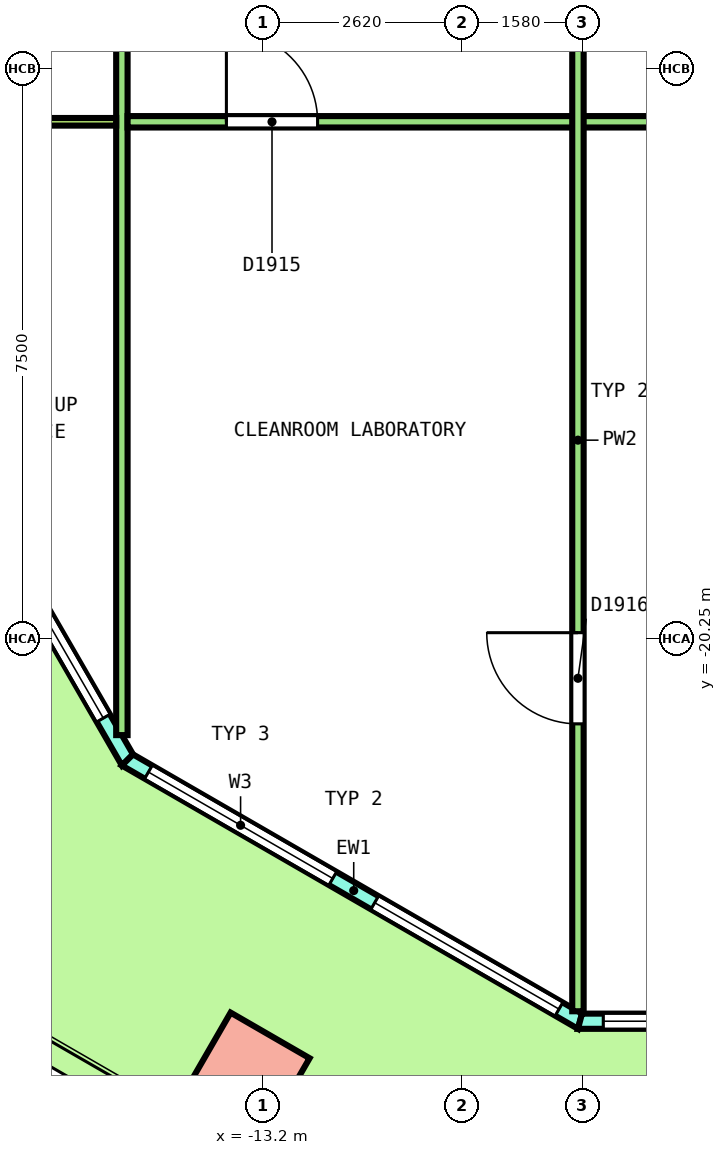
"""IFC4 building model, lengths in metres.
Left out: names, types, materials, properties, quantities, classifications, styles, units other than length and angle.
Written with IfcOpenShell. Run it as: python <this file> out.ifc"""

import sys

from ifc_helpers import new_model, si_unit, direction, frame, frame_2d, origin, origin_2d, place, context, subcontext, project, spatial, polyline, rectangle, outline, extrude, element, fill, save


model = new_model("IFC4")
c1 = context("Model", 3, precision=1e-05, world=origin(), true_north=direction((0.0, 1.0)))
c2 = subcontext(c1, "Body", "Model", "MODEL_VIEW")
j1 = project(units=[si_unit("LENGTHUNIT", "METRE"), si_unit("PLANEANGLEUNIT", "RADIAN")], contexts=[c1])
p1 = place(None, origin())
s1 = spatial("IfcSite", under=j1, at=p1, CompositionType="ELEMENT")
p2 = place(p1, origin())
s2 = spatial("IfcBuilding", under=s1, at=p2, CompositionType="ELEMENT")
p3 = place(p2, frame((0.0, 0.0, 193.6)))
s3 = spatial("IfcBuildingStorey", under=s2, at=p3, CompositionType="ELEMENT", Elevation=193.6)
p4 = place(p3, frame((-13.408, -25.989, 0.0), z_axis=(0.0, 0.0, 1.0), x_axis=(0.866025403784, -0.5, 0.0)))
e1 = element("IfcColumn", 1, at=p4, inside=s3, PredefinedType="COLUMN", context=c2, shape_type="SweptSolid", body=[
    extrude(rectangle(XDim=1.2, YDim=1.2, at=origin_2d()), origin(), (0.0, 0.0, 1.0), 4.04),
])
p5 = place(p3, frame((-26.411, -2.055, 0.0), z_axis=(0.0, 0.0, 1.0), x_axis=(0.50000204422, -0.86602422355, 0.0)))
e2 = element("IfcWall", 2, at=p5, inside=s3, PredefinedType="SOLIDWALL", context=c2, shape_type="SweptSolid", body=[
    extrude(outline(polyline([(-0.027, -0.1), (1.014, -0.1), (2.055, -0.1), (3.097, -0.1), (4.138, -0.1), (5.179, -0.1), (6.22, -0.1), (7.261, -0.1), (8.303, -0.1), (9.344, -0.1), (10.385, -0.1), (11.426, -0.1), (12.468, -0.1), (13.509, -0.1), (14.55, -0.1), (15.591, -0.1), (16.632, -0.1), (17.673, -0.1), (18.715, -0.1), (19.756, -0.1), (20.797, -0.1), (21.838, -0.1), (22.879, -0.1), (22.826, 0.1), (21.789, 0.1), (20.753, 0.1), (19.717, 0.1), (18.68, 0.1), (17.644, 0.1), (16.608, 0.1), (15.572, 0.1), (14.535, 0.1), (13.499, 0.1), (12.463, 0.1), (11.426, 0.1), (10.39, 0.1), (9.354, 0.1), (8.317, 0.1), (7.281, 0.1), (6.245, 0.1), (5.208, 0.1), (4.172, 0.1), (3.136, 0.1), (2.099, 0.1), (1.063, 0.1), (0.027, 0.1), (-0.027, -0.1)])), origin(), (0.0, 0.0, 1.0), 4.1),
])
p6 = place(p5, frame((0.635, 0.0, 0.1)))
e3 = element("IfcOpeningElement", 3, at=p6, cuts=e2, PredefinedType="OPENING", context=c2, shape_type="SweptSolid", body=[
    extrude(rectangle(XDim=3.3, YDim=2.9, at=frame_2d((1.65, 1.45))), frame((0.0, 0.11, 0.0), z_axis=(0.0, -1.0, 0.0), x_axis=(1.0, 0.0, 0.0)), (0.0, 0.0, 1.0), 0.22),
])
p7 = place(p5, frame((5.206, 0.0, 0.1)))
e4 = element("IfcOpeningElement", 4, at=p7, cuts=e2, PredefinedType="OPENING", context=c2, shape_type="SweptSolid", body=[
    extrude(rectangle(XDim=3.3, YDim=2.9, at=frame_2d((1.65, 1.45))), frame((0.0, 0.11, 0.0), z_axis=(0.0, -1.0, 0.0), x_axis=(1.0, 0.0, 0.0)), (0.0, 0.0, 1.0), 0.22),
])
p8 = place(p5, frame((10.526, 0.0, 0.0)))
e5 = element("IfcOpeningElement", 5, at=p8, cuts=e2, PredefinedType="OPENING", context=c2, shape_type="SweptSolid", body=[
    extrude(rectangle(XDim=1.8, YDim=2.4, at=frame_2d((0.9, 1.2))), frame((0.0, 0.11, 0.0), z_axis=(0.0, -1.0, 0.0), x_axis=(1.0, 0.0, 0.0)), (0.0, 0.0, 1.0), 0.22),
])
p9 = place(p5, frame((10.526, 0.0, 2.55)))
e6 = element("IfcOpeningElement", 6, at=p9, cuts=e2, PredefinedType="OPENING", context=c2, shape_type="SweptSolid", body=[
    extrude(rectangle(XDim=1.8, YDim=0.45, at=frame_2d((0.9, 0.225))), frame((0.0, 0.11, 0.0), z_axis=(0.0, -1.0, 0.0), x_axis=(1.0, 0.0, 0.0)), (0.0, 0.0, 1.0), 0.22),
])
p10 = place(p5, frame((14.347, 0.0, 0.1)))
e7 = element("IfcOpeningElement", 7, at=p10, cuts=e2, PredefinedType="OPENING", context=c2, shape_type="SweptSolid", body=[
    extrude(rectangle(XDim=3.3, YDim=2.9, at=frame_2d((1.65, 1.45))), frame((0.0, 0.11, 0.0), z_axis=(0.0, -1.0, 0.0), x_axis=(1.0, 0.0, 0.0)), (0.0, 0.0, 1.0), 0.22),
])
p11 = place(p5, frame((18.917, 0.0, 0.1)))
e8 = element("IfcOpeningElement", 8, at=p11, cuts=e2, PredefinedType="OPENING", context=c2, shape_type="SweptSolid", body=[
    extrude(rectangle(XDim=3.3, YDim=2.9, at=frame_2d((1.65, 1.45))), frame((0.0, 0.11, 0.0), z_axis=(0.0, -1.0, 0.0), x_axis=(1.0, 0.0, 0.0)), (0.0, 0.0, 1.0), 0.22),
])
p12 = place(p3, frame((-14.985, -21.845, 0.0), z_axis=(0.0, 0.0, 1.0), x_axis=(0.866029458321, -0.49999297727, 0.0)))
e9 = element("IfcWall", 9, at=p12, inside=s3, PredefinedType="SOLIDWALL", context=c2, shape_type="SweptSolid", body=[
    extrude(outline(polyline([(-0.027, -0.1), (1.128, -0.1), (2.282, -0.1), (3.437, -0.1), (4.592, -0.1), (5.747, -0.1), (6.901, -0.1), (6.848, 0.1), (5.711, 0.1), (4.574, 0.1), (3.437, 0.1), (2.301, 0.1), (1.164, 0.1), (0.027, 0.1), (-0.027, -0.1)])), origin(), (0.0, 0.0, 1.0), 4.1),
])
p13 = place(p12, frame((0.319, 0.0, 0.1)))
e10 = element("IfcOpeningElement", 10, at=p13, cuts=e9, PredefinedType="OPENING", context=c2, shape_type="SweptSolid", body=[
    extrude(rectangle(XDim=2.8, YDim=2.9, at=frame_2d((1.4, 1.45))), frame((0.0, 0.11, 0.0), z_axis=(0.0, -1.0, 0.0), x_axis=(1.0, 0.0, 0.0)), (0.0, 0.0, 1.0), 0.22),
])
p14 = place(p12, frame((3.756, 0.0, 0.1)))
e11 = element("IfcOpeningElement", 11, at=p14, cuts=e9, PredefinedType="OPENING", context=c2, shape_type="SweptSolid", body=[
    extrude(rectangle(XDim=2.8, YDim=2.9, at=frame_2d((1.4, 1.45))), frame((0.0, 0.11, 0.0), z_axis=(0.0, -1.0, 0.0), x_axis=(1.0, 0.0, 0.0)), (0.0, 0.0, 1.0), 0.22),
])
p15 = place(p3, frame((-9.031, -25.283, 0.0), z_axis=(0.0, 0.0, 1.0), x_axis=(1.0, 0.0, 0.0)))
e12 = element("IfcWall", 12, at=p15, inside=s3, PredefinedType="SOLIDWALL", context=c2, shape_type="SweptSolid", body=[
    extrude(outline(polyline([(-0.027, -0.1), (0.979, -0.1), (1.986, -0.1), (2.992, -0.1), (3.999, -0.1), (5.005, -0.1), (6.012, -0.1), (7.018, -0.1), (8.025, -0.1), (9.031, -0.1), (10.038, -0.1), (11.044, -0.1), (12.051, -0.1), (13.057, -0.1), (14.063, -0.1), (15.07, -0.1), (16.076, -0.1), (17.083, -0.1), (18.089, -0.1), (18.036, 0.1), (17.035, 0.1), (16.035, 0.1), (15.034, 0.1), (14.034, 0.1), (13.033, 0.1), (12.033, 0.1), (11.032, 0.1), (10.032, 0.1), (9.031, 0.1), (8.031, 0.1), (7.03, 0.1), (6.03, 0.1), (5.029, 0.1), (4.029, 0.1), (3.028, 0.1), (2.028, 0.1), (1.027, 0.1), (0.027, 0.1), (-0.027, -0.1)])), origin(), (0.0, 0.0, 1.0), 4.1),
])
p16 = place(p15, frame((0.306, 0.0, 0.1)))
e13 = element("IfcOpeningElement", 13, at=p16, cuts=e12, PredefinedType="OPENING", context=c2, shape_type="SweptSolid", body=[
    extrude(rectangle(XDim=3.0, YDim=2.9, at=frame_2d((1.5, 1.45))), frame((0.0, 0.11, 0.0), z_axis=(0.0, -1.0, 0.0), x_axis=(1.0, 0.0, 0.0)), (0.0, 0.0, 1.0), 0.22),
])
p17 = place(p15, frame((3.919, 0.0, 0.1)))
e14 = element("IfcOpeningElement", 14, at=p17, cuts=e12, PredefinedType="OPENING", context=c2, shape_type="SweptSolid", body=[
    extrude(rectangle(XDim=3.0, YDim=2.9, at=frame_2d((1.5, 1.45))), frame((0.0, 0.11, 0.0), z_axis=(0.0, -1.0, 0.0), x_axis=(1.0, 0.0, 0.0)), (0.0, 0.0, 1.0), 0.22),
])
p18 = place(p15, frame((8.131, 0.0, 0.0)))
e15 = element("IfcOpeningElement", 15, at=p18, cuts=e12, PredefinedType="OPENING", context=c2, shape_type="SweptSolid", body=[
    extrude(rectangle(XDim=1.8, YDim=2.4, at=frame_2d((0.9, 1.2))), frame((0.0, 0.11, 0.0), z_axis=(0.0, -1.0, 0.0), x_axis=(1.0, 0.0, 0.0)), (0.0, 0.0, 1.0), 0.22),
])
p19 = place(p15, frame((8.131, 0.0, 2.55)))
e16 = element("IfcOpeningElement", 16, at=p19, cuts=e12, PredefinedType="OPENING", context=c2, shape_type="SweptSolid", body=[
    extrude(rectangle(XDim=1.8, YDim=0.45, at=frame_2d((0.9, 0.225))), frame((0.0, 0.11, 0.0), z_axis=(0.0, -1.0, 0.0), x_axis=(1.0, 0.0, 0.0)), (0.0, 0.0, 1.0), 0.22),
])
p20 = place(p15, frame((11.144, 0.0, 0.1)))
e17 = element("IfcOpeningElement", 17, at=p20, cuts=e12, PredefinedType="OPENING", context=c2, shape_type="SweptSolid", body=[
    extrude(rectangle(XDim=3.0, YDim=2.9, at=frame_2d((1.5, 1.45))), frame((0.0, 0.11, 0.0), z_axis=(0.0, -1.0, 0.0), x_axis=(1.0, 0.0, 0.0)), (0.0, 0.0, 1.0), 0.22),
])
p21 = place(p15, frame((14.756, 0.0, 0.1)))
e18 = element("IfcOpeningElement", 18, at=p21, cuts=e12, PredefinedType="OPENING", context=c2, shape_type="SweptSolid", body=[
    extrude(rectangle(XDim=3.0, YDim=2.9, at=frame_2d((1.5, 1.45))), frame((0.0, 0.11, 0.0), z_axis=(0.0, -1.0, 0.0), x_axis=(1.0, 0.0, 0.0)), (0.0, 0.0, 1.0), 0.22),
])
p22 = place(p3, frame((-15.058, -21.519, 0.0), z_axis=(0.0, 0.0, 1.0), x_axis=(0.0, 1.0, 0.0)))
e19 = element("IfcWall", 19, at=p22, inside=s3, PredefinedType="PARTITIONING", context=c2, shape_type="SweptSolid", body=[
    extrude(rectangle(XDim=11.394, YDim=0.15, at=frame_2d((5.697, 0.0))), origin(), (0.0, 0.0, 1.0), 3.05),
])
p23 = place(p3, frame((-14.983, -13.45, 0.0), z_axis=(0.0, 0.0, 1.0), x_axis=(1.0, 0.0, 0.0)))
e20 = element("IfcWall", 20, at=p23, inside=s3, PredefinedType="PARTITIONING", context=c2, shape_type="SweptSolid", body=[
    extrude(rectangle(XDim=31.004, YDim=0.15, at=frame_2d((15.502, 0.0))), origin(), (0.0, 0.0, 1.0), 3.05),
])
p24 = place(p23, frame((1.3, 0.0, 0.0)))
e21 = element("IfcOpeningElement", 21, at=p24, cuts=e20, PredefinedType="OPENING", context=c2, shape_type="SweptSolid", body=[
    extrude(rectangle(XDim=1.2, YDim=2.1, at=frame_2d((0.6, 1.05))), frame((0.0, 0.085, 0.0), z_axis=(0.0, -1.0, 0.0), x_axis=(1.0, 0.0, 0.0)), (0.0, 0.0, 1.0), 0.17),
])
p25 = place(p3, frame((-9.058, -25.152, 0.0), z_axis=(0.0, 0.0, 1.0), x_axis=(0.0, 1.0, 0.0)))
e22 = element("IfcWall", 22, at=p25, inside=s3, PredefinedType="PARTITIONING", context=c2, shape_type="SweptSolid", body=[
    extrude(rectangle(XDim=15.027, YDim=0.15, at=frame_2d((7.513, 0.0))), origin(), (0.0, 0.0, 1.0), 3.05),
])
p26 = place(p25, frame((3.781, 0.0, 0.0)))
e23 = element("IfcOpeningElement", 23, at=p26, cuts=e22, PredefinedType="OPENING", context=c2, shape_type="SweptSolid", body=[
    extrude(rectangle(XDim=1.2, YDim=2.1, at=frame_2d((0.6, 1.05))), frame((0.0, 0.085, 0.0), z_axis=(0.0, -1.0, 0.0), x_axis=(1.0, 0.0, 0.0)), (0.0, 0.0, 1.0), 0.17),
])
p27 = place(p3, frame((-18.5, -13.45, 0.0), z_axis=(0.0, 0.0, 1.0), x_axis=(1.0, 0.0, 0.0)))
e24 = element("IfcWall", 24, at=p27, inside=s3, PredefinedType="PARTITIONING", context=c2, shape_type="SweptSolid", body=[
    extrude(rectangle(XDim=3.367, YDim=0.1, at=frame_2d((1.684, 0.0))), origin(), (0.0, 0.0, 1.0), 4.1),
])
p28 = place(p11, origin())
e25 = element("IfcWindow", 25, at=p28, inside=s3, PartitioningType="SINGLE_PANEL", PredefinedType="WINDOW", context=c2, shape_type="SweptSolid", body=[
    extrude(rectangle(XDim=3.3, YDim=2.9, at=frame_2d((1.65, 1.45))), frame((0.0, 0.03, 0.0), z_axis=(0.0, -1.0, 0.0), x_axis=(1.0, 0.0, 0.0)), (0.0, 0.0, 1.0), 0.06),
])
fill(e8, e25)
p29 = place(p13, origin())
e26 = element("IfcWindow", 26, at=p29, inside=s3, PartitioningType="SINGLE_PANEL", PredefinedType="WINDOW", context=c2, shape_type="SweptSolid", body=[
    extrude(rectangle(XDim=2.8, YDim=2.9, at=frame_2d((1.4, 1.45))), frame((0.0, 0.03, 0.0), z_axis=(0.0, -1.0, 0.0), x_axis=(1.0, 0.0, 0.0)), (0.0, 0.0, 1.0), 0.06),
])
fill(e10, e26)
p30 = place(p14, origin())
e27 = element("IfcWindow", 27, at=p30, inside=s3, PartitioningType="SINGLE_PANEL", PredefinedType="WINDOW", context=c2, shape_type="SweptSolid", body=[
    extrude(rectangle(XDim=2.8, YDim=2.9, at=frame_2d((1.4, 1.45))), frame((0.0, 0.03, 0.0), z_axis=(0.0, -1.0, 0.0), x_axis=(1.0, 0.0, 0.0)), (0.0, 0.0, 1.0), 0.06),
])
fill(e11, e27)
p31 = place(p16, origin())
e28 = element("IfcWindow", 28, at=p31, inside=s3, PartitioningType="SINGLE_PANEL", PredefinedType="WINDOW", context=c2, shape_type="SweptSolid", body=[
    extrude(rectangle(XDim=3.0, YDim=2.9, at=frame_2d((1.5, 1.45))), frame((0.0, 0.03, 0.0), z_axis=(0.0, -1.0, 0.0), x_axis=(1.0, 0.0, 0.0)), (0.0, 0.0, 1.0), 0.06),
])
fill(e13, e28)
p32 = place(p24, origin())
e29 = element("IfcDoor", 29, at=p32, inside=s3, OperationType="DOUBLE_DOOR_SINGLE_SWING", PredefinedType="DOOR", context=c2, shape_type="SweptSolid", body=[
    extrude(rectangle(XDim=1.2, YDim=2.1, at=frame_2d((0.6, 1.05))), frame((0.0, 0.025, 0.0), z_axis=(0.0, -1.0, 0.0), x_axis=(1.0, 0.0, 0.0)), (0.0, 0.0, 1.0), 0.05),
])
fill(e21, e29)
p33 = place(p26, origin())
e30 = element("IfcDoor", 30, at=p33, inside=s3, OperationType="DOUBLE_DOOR_SINGLE_SWING", PredefinedType="DOOR", context=c2, shape_type="SweptSolid", body=[
    extrude(rectangle(XDim=1.2, YDim=2.1, at=frame_2d((0.6, 1.05))), frame((0.0, 0.025, 0.0), z_axis=(0.0, -1.0, 0.0), x_axis=(1.0, 0.0, 0.0)), (0.0, 0.0, 1.0), 0.05),
])
fill(e23, e30)
save(model, sys.argv[1])
